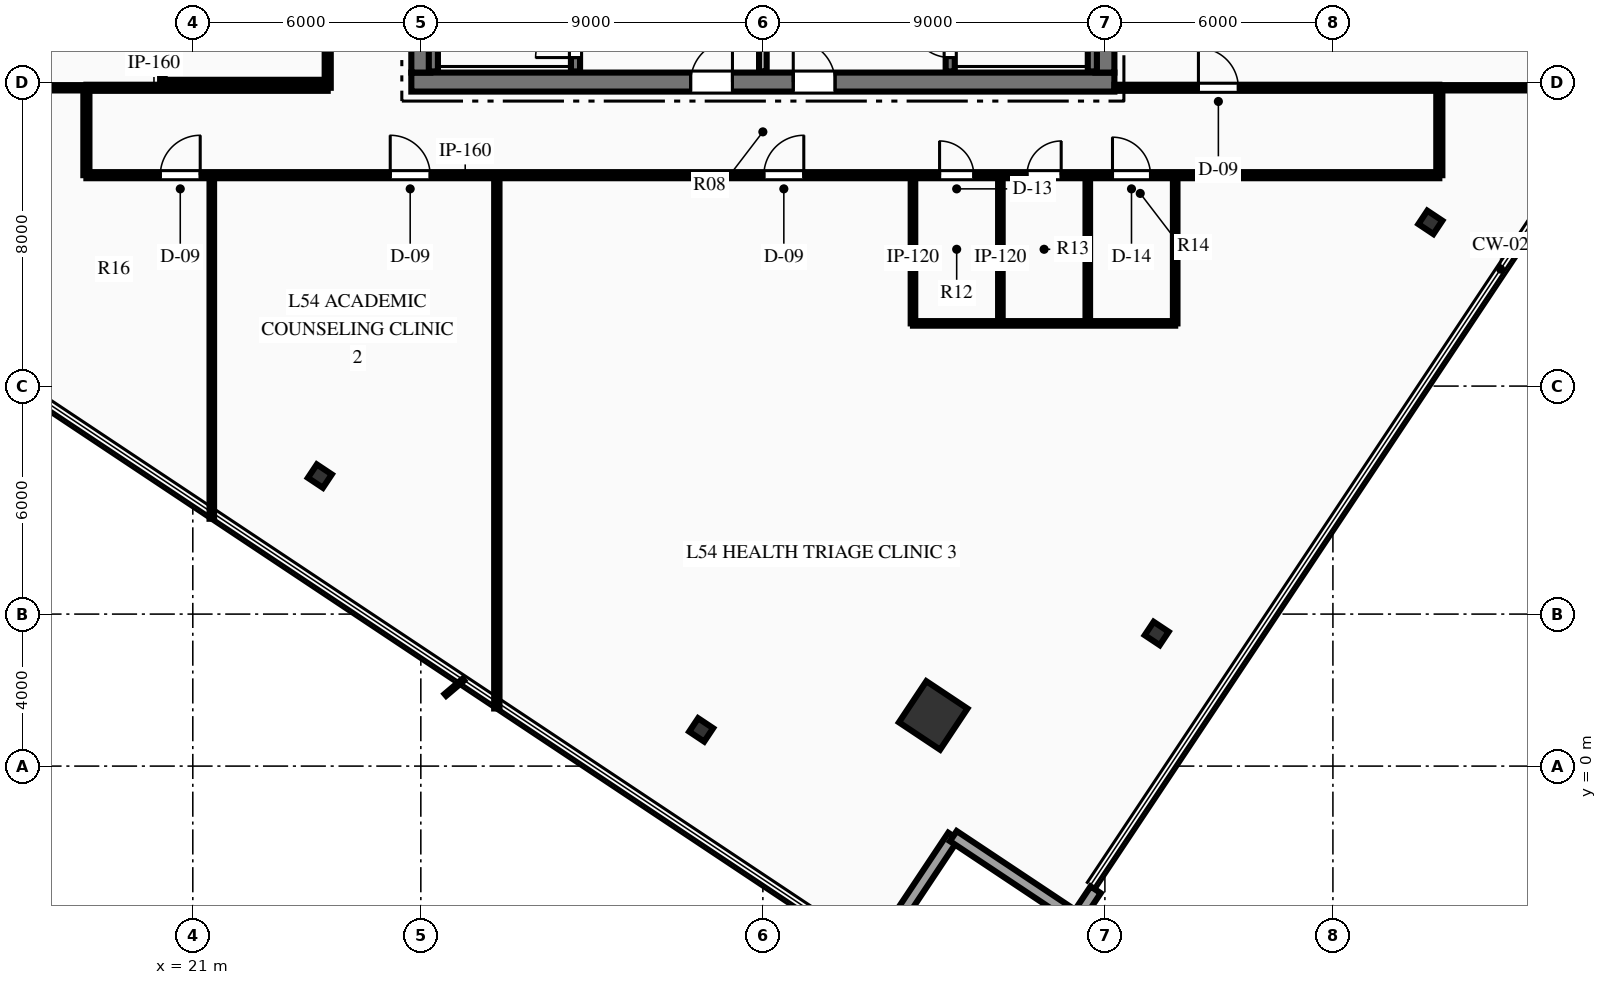
"""IFC4 building model, lengths in metres.
Left out: names, types, materials, properties, quantities, classifications, styles, units other than length and angle.
Written with IfcOpenShell. Run it as: python <this file> out.ifc"""

import sys

from ifc_helpers import new_model, si_unit, direction, frame, frame_2d, origin, origin_2d, place, context, subcontext, project, spatial, rectangle, hollow_rectangle, i_section, extrude, element, fill, save


model = new_model("IFC4")
c1 = context("Model", 3, precision=1e-05, world=origin(), true_north=direction((0.0, 1.0)))
c2 = subcontext(c1, "Body", "Model", "MODEL_VIEW")
j1 = project(units=[si_unit("LENGTHUNIT", "METRE"), si_unit("PLANEANGLEUNIT", "RADIAN")], contexts=[c1])
p1 = place(None, origin())
s1 = spatial("IfcSite", under=j1, at=p1, CompositionType="ELEMENT")
p2 = place(p1, origin())
s2 = spatial("IfcBuilding", under=s1, at=p2, CompositionType="ELEMENT")
p3 = place(p2, frame((0.0, 0.0, 217.2)))
s3 = spatial("IfcBuildingStorey", under=s2, at=p3, CompositionType="ELEMENT", Elevation=217.2)
p4 = place(p3, frame((26.75, 18.0, 0.0), z_axis=(0.0, 0.0, 1.0), x_axis=(1.0, 0.0, 0.0)))
e1 = element("IfcWall", 1, at=p4, inside=s3, PredefinedType="SHEAR", context=c2, shape_type="SweptSolid", body=[
    extrude(rectangle(XDim=18.5, YDim=0.5, at=frame_2d((9.25, 0.0))), origin(), (0.0, 0.0, 1.0), 3.75),
])
p5 = place(p4, frame((7.35, 0.0, 0.0)))
e2 = element("IfcOpeningElement", 2, at=p5, cuts=e1, PredefinedType="OPENING", context=c2, shape_type="SweptSolid", body=[
    extrude(rectangle(XDim=1.1, YDim=2.15, at=frame_2d((0.55, 1.075))), frame((0.0, 0.26, 0.0), z_axis=(0.0, -1.0, 0.0), x_axis=(1.0, 0.0, 0.0)), (0.0, 0.0, 1.0), 0.52),
])
p6 = place(p4, frame((10.05, 0.0, 0.0)))
e3 = element("IfcOpeningElement", 3, at=p6, cuts=e1, PredefinedType="OPENING", context=c2, shape_type="SweptSolid", body=[
    extrude(rectangle(XDim=1.1, YDim=2.15, at=frame_2d((0.55, 1.075))), frame((0.0, 0.26, 0.0), z_axis=(0.0, -1.0, 0.0), x_axis=(1.0, 0.0, 0.0)), (0.0, 0.0, 1.0), 0.52),
])
p7 = place(p3, frame((27.0, 18.25, 0.0), z_axis=(0.0, 0.0, 1.0), x_axis=(0.0, 1.0, 0.0)))
e4 = element("IfcWall", 4, at=p7, inside=s3, PredefinedType="SHEAR", context=c2, shape_type="SweptSolid", body=[
    extrude(rectangle(XDim=15.5, YDim=0.5, at=frame_2d((7.75, 0.0))), origin(), (0.0, 0.0, 1.0), 3.75),
])
p8 = place(p7, frame((9.99, 0.0, 0.0)))
e5 = element("IfcOpeningElement", 5, at=p8, cuts=e4, PredefinedType="OPENING", context=c2, shape_type="SweptSolid", body=[
    extrude(rectangle(XDim=1.4, YDim=2.2, at=frame_2d((0.7, 1.1))), frame((0.0, 0.26, 0.0), z_axis=(0.0, -1.0, 0.0), x_axis=(1.0, 0.0, 0.0)), (0.0, 0.0, 1.0), 0.52),
])
p9 = place(p3, frame((45.0, 18.25, 0.0), z_axis=(0.0, 0.0, 1.0), x_axis=(0.0, 1.0, 0.0)))
e6 = element("IfcWall", 6, at=p9, inside=s3, PredefinedType="SHEAR", context=c2, shape_type="SweptSolid", body=[
    extrude(rectangle(XDim=15.5, YDim=0.5, at=frame_2d((7.75, 0.0))), origin(), (0.0, 0.0, 1.0), 3.75),
])
p10 = place(p9, frame((9.99, 0.0, 0.0)))
e7 = element("IfcOpeningElement", 7, at=p10, cuts=e6, PredefinedType="OPENING", context=c2, shape_type="SweptSolid", body=[
    extrude(rectangle(XDim=1.4, YDim=2.2, at=frame_2d((0.7, 1.1))), frame((0.0, 0.26, 0.0), z_axis=(0.0, -1.0, 0.0), x_axis=(1.0, 0.0, 0.0)), (0.0, 0.0, 1.0), 0.52),
])
p11 = place(p3, frame((31.07, 18.28, 0.0), z_axis=(0.0, 0.0, 1.0), x_axis=(0.0, 1.0, 0.0)))
e8 = element("IfcWall", 8, at=p11, inside=s3, PredefinedType="SHEAR", context=c2, shape_type="SweptSolid", body=[
    extrude(rectangle(XDim=8.26, YDim=0.24, at=frame_2d((4.13, 0.0))), origin(), (0.0, 0.0, 1.0), 3.75),
])
p12 = place(p11, frame((0.365, 0.0, 0.0)))
e9 = element("IfcOpeningElement", 9, at=p12, cuts=e8, PredefinedType="OPENING", context=c2, shape_type="SweptSolid", body=[
    extrude(rectangle(XDim=1.05, YDim=2.15, at=frame_2d((0.525, 1.075))), frame((0.0, 0.13, 0.0), z_axis=(0.0, -1.0, 0.0), x_axis=(1.0, 0.0, 0.0)), (0.0, 0.0, 1.0), 0.26),
])
p13 = place(p3, frame((27.33, 18.28, 0.0), z_axis=(0.0, 0.0, 1.0), x_axis=(0.0, 1.0, 0.0)))
e10 = element("IfcWall", 10, at=p13, inside=s3, PredefinedType="SHEAR", context=c2, shape_type="SweptSolid", body=[
    extrude(rectangle(XDim=8.26, YDim=0.24, at=frame_2d((4.13, 0.0))), origin(), (0.0, 0.0, 1.0), 3.75),
])
p14 = place(p3, frame((40.93, 18.28, 0.0), z_axis=(0.0, 0.0, 1.0), x_axis=(0.0, 1.0, 0.0)))
e11 = element("IfcWall", 11, at=p14, inside=s3, PredefinedType="SHEAR", context=c2, shape_type="SweptSolid", body=[
    extrude(rectangle(XDim=8.26, YDim=0.24, at=frame_2d((4.13, 0.0))), origin(), (0.0, 0.0, 1.0), 3.75),
])
p15 = place(p14, frame((0.365, 0.0, 0.0)))
e12 = element("IfcOpeningElement", 12, at=p15, cuts=e11, PredefinedType="OPENING", context=c2, shape_type="SweptSolid", body=[
    extrude(rectangle(XDim=1.05, YDim=2.15, at=frame_2d((0.525, 1.075))), frame((0.0, 0.13, 0.0), z_axis=(0.0, -1.0, 0.0), x_axis=(1.0, 0.0, 0.0)), (0.0, 0.0, 1.0), 0.26),
])
p16 = place(p3, frame((44.67, 18.28, 0.0), z_axis=(0.0, 0.0, 1.0), x_axis=(0.0, 1.0, 0.0)))
e13 = element("IfcWall", 13, at=p16, inside=s3, PredefinedType="SHEAR", context=c2, shape_type="SweptSolid", body=[
    extrude(rectangle(XDim=8.26, YDim=0.24, at=frame_2d((4.13, 0.0))), origin(), (0.0, 0.0, 1.0), 3.75),
])
p17 = place(p3, frame((40.483, 1.333, 0.0), z_axis=(0.0, 0.0, 1.0), x_axis=(0.554118199338, 0.832437998389, 0.0)))
e14 = element("IfcColumn", 14, at=p17, inside=s3, PredefinedType="COLUMN", context=c2, shape_type="SweptSolid", body=[
    extrude(hollow_rectangle(XDim=1.3, YDim=1.3, WallThickness=0.06, at=origin_2d()), origin(), (0.0, 0.0, 1.0), 3.75),
])
for number, where, z_axis, x_axis in (
    (15, (46.363, 3.49, 0.0), (0.0, 0.0, 1.0), (0.554, 0.832, 0.0)),
    (16, (53.564, 14.308, 0.0), (0.0, 0.0, 1.0), (0.554, 0.832, 0.0)),
    (17, (24.343, 7.631, 0.0), (0.0, 0.0, 1.0), (0.554, 0.832, 0.0)),
    (18, (34.377, 0.952, 0.0), (0.0, 0.0, 1.0), (0.554, 0.832, 0.0)),
):
    element("IfcColumn", number, at=place(p3, frame(where, z_axis=z_axis, x_axis=x_axis)), inside=s3, PredefinedType="COLUMN", context=c2, shape_type="SweptSolid", body=[
        extrude(i_section(OverallWidth=0.424, OverallDepth=0.474, WebThickness=0.048, FlangeThickness=0.077, at=origin_2d()), origin(), (0.0, 0.0, 1.0), 3.75),
    ])
p18 = place(p3, frame((44.757, -3.254, 0.0), z_axis=(0.0, 0.0, 1.0), x_axis=(-0.554261868623, -0.832342346028, 0.0)))
e19 = element("IfcWall", 19, at=p18, inside=s3, PredefinedType="STANDARD", context=c2, shape_type="SweptSolid", body=[
    extrude(rectangle(XDim=0.9, YDim=0.32, at=frame_2d((0.45, 0.0))), origin(), (0.0, 0.0, 1.0), 3.47),
])
p19 = place(p3, frame((41.012, -1.843, 0.0), z_axis=(0.0, 0.0, 1.0), x_axis=(-0.554122229834, -0.832435315447, 0.0)))
e20 = element("IfcWall", 20, at=p19, inside=s3, PredefinedType="STANDARD", context=c2, shape_type="SweptSolid", body=[
    extrude(rectangle(XDim=3.9, YDim=0.32, at=frame_2d((1.95, 0.0))), origin(), (0.0, 0.0, 1.0), 3.47),
])
p20 = place(p3, frame((44.258, -4.003, 0.0), z_axis=(0.0, 0.0, 1.0), x_axis=(-0.832464190202, 0.554078850013, 0.0)))
e21 = element("IfcWall", 21, at=p20, inside=s3, PredefinedType="STANDARD", context=c2, shape_type="SweptSolid", body=[
    extrude(rectangle(XDim=3.9, YDim=0.32, at=frame_2d((1.95, 0.0))), origin(), (0.0, 0.0, 1.0), 3.47),
])
p21 = place(p3, frame((36.0, 18.28, 0.0), z_axis=(0.0, 0.0, 1.0), x_axis=(0.0, 1.0, 0.0)))
e22 = element("IfcWall", 22, at=p21, inside=s3, PredefinedType="PARTITIONING", context=c2, shape_type="SweptSolid", body=[
    extrude(rectangle(XDim=3.77, YDim=0.2, at=frame_2d((1.885, 0.0))), origin(), (0.0, 0.0, 1.0), 3.47),
])
p22 = place(p3, frame((18.2, 15.55, 0.0), z_axis=(0.0, 0.0, 1.0), x_axis=(1.0, 0.0, 0.0)))
e23 = element("IfcWall", 23, at=p22, inside=s3, PredefinedType="PARTITIONING", context=c2, shape_type="SweptSolid", body=[
    extrude(rectangle(XDim=35.6, YDim=0.16, at=frame_2d((17.8, 0.0))), origin(), (0.0, 0.0, 1.0), 2.849),
])
p23 = place(p22, frame((22.45, 0.0, 0.0)))
e24 = element("IfcOpeningElement", 24, at=p23, cuts=e23, PredefinedType="OPENING", context=c2, shape_type="SweptSolid", body=[
    extrude(rectangle(XDim=0.9, YDim=2.15, at=frame_2d((0.45, 1.075))), frame((0.0, 0.09, 0.0), z_axis=(0.0, -1.0, 0.0), x_axis=(1.0, 0.0, 0.0)), (0.0, 0.0, 1.0), 0.18),
])
p24 = place(p22, frame((24.75, 0.0, 0.0)))
e25 = element("IfcOpeningElement", 25, at=p24, cuts=e23, PredefinedType="OPENING", context=c2, shape_type="SweptSolid", body=[
    extrude(rectangle(XDim=0.9, YDim=2.15, at=frame_2d((0.45, 1.075))), frame((0.0, 0.09, 0.0), z_axis=(0.0, -1.0, 0.0), x_axis=(1.0, 0.0, 0.0)), (0.0, 0.0, 1.0), 0.18),
])
p25 = place(p22, frame((27.0, 0.0, 0.0)))
e26 = element("IfcOpeningElement", 26, at=p25, cuts=e23, PredefinedType="OPENING", context=c2, shape_type="SweptSolid", body=[
    extrude(rectangle(XDim=1.0, YDim=2.15, at=frame_2d((0.5, 1.075))), frame((0.0, 0.09, 0.0), z_axis=(0.0, -1.0, 0.0), x_axis=(1.0, 0.0, 0.0)), (0.0, 0.0, 1.0), 0.18),
])
p26 = place(p22, frame((1.945, 0.0, 0.0)))
e27 = element("IfcOpeningElement", 27, at=p26, cuts=e23, PredefinedType="OPENING", context=c2, shape_type="SweptSolid", body=[
    extrude(rectangle(XDim=1.05, YDim=2.15, at=frame_2d((0.525, 1.075))), frame((0.0, 0.09, 0.0), z_axis=(0.0, -1.0, 0.0), x_axis=(1.0, 0.0, 0.0)), (0.0, 0.0, 1.0), 0.18),
])
p27 = place(p22, frame((7.995, 0.0, 0.0)))
e28 = element("IfcOpeningElement", 28, at=p27, cuts=e23, PredefinedType="OPENING", context=c2, shape_type="SweptSolid", body=[
    extrude(rectangle(XDim=1.05, YDim=2.15, at=frame_2d((0.525, 1.075))), frame((0.0, 0.09, 0.0), z_axis=(0.0, -1.0, 0.0), x_axis=(1.0, 0.0, 0.0)), (0.0, 0.0, 1.0), 0.18),
])
p28 = place(p22, frame((17.827, 0.0, 0.0)))
e29 = element("IfcOpeningElement", 29, at=p28, cuts=e23, PredefinedType="OPENING", context=c2, shape_type="SweptSolid", body=[
    extrude(rectangle(XDim=1.05, YDim=2.15, at=frame_2d((0.525, 1.075))), frame((0.0, 0.09, 0.0), z_axis=(0.0, -1.0, 0.0), x_axis=(1.0, 0.0, 0.0)), (0.0, 0.0, 1.0), 0.18),
])
p29 = place(p3, frame((18.2, 17.85, 0.0), z_axis=(0.0, 0.0, 1.0), x_axis=(1.0, 0.0, 0.0)))
e30 = element("IfcWall", 30, at=p29, inside=s3, PredefinedType="PARTITIONING", context=c2, shape_type="SweptSolid", body=[
    extrude(rectangle(XDim=6.35, YDim=0.16, at=frame_2d((3.175, 0.0))), origin(), (0.0, 0.0, 1.0), 3.47),
])
p30 = place(p3, frame((45.25, 17.85, 0.0), z_axis=(0.0, 0.0, 1.0), x_axis=(1.0, 0.0, 0.0)))
e31 = element("IfcWall", 31, at=p30, inside=s3, PredefinedType="PARTITIONING", context=c2, shape_type="SweptSolid", body=[
    extrude(rectangle(XDim=8.55, YDim=0.16, at=frame_2d((4.275, 0.0))), origin(), (0.0, 0.0, 1.0), 3.47),
])
p31 = place(p30, frame((2.211, 0.0, 0.0)))
e32 = element("IfcOpeningElement", 32, at=p31, cuts=e31, PredefinedType="OPENING", context=c2, shape_type="SweptSolid", body=[
    extrude(rectangle(XDim=1.05, YDim=2.15, at=frame_2d((0.525, 1.075))), frame((0.0, 0.09, 0.0), z_axis=(0.0, -1.0, 0.0), x_axis=(1.0, 0.0, 0.0)), (0.0, 0.0, 1.0), 0.18),
])
p32 = place(p3, frame((24.55, 17.85, 0.0), z_axis=(0.0, 0.0, 1.0), x_axis=(0.0, 1.0, 0.0)))
e33 = element("IfcWall", 33, at=p32, inside=s3, PredefinedType="PARTITIONING", context=c2, shape_type="SweptSolid", body=[
    extrude(rectangle(XDim=16.3, YDim=0.16, at=frame_2d((8.15, 0.0))), origin(), (0.0, 0.0, 1.0), 3.47),
])
p33 = place(p32, frame((2.775, 0.0, 0.0)))
e34 = element("IfcOpeningElement", 34, at=p33, cuts=e33, PredefinedType="OPENING", context=c2, shape_type="SweptSolid", body=[
    extrude(rectangle(XDim=0.95, YDim=2.15, at=frame_2d((0.475, 1.075))), frame((0.0, 0.09, 0.0), z_axis=(0.0, -1.0, 0.0), x_axis=(1.0, 0.0, 0.0)), (0.0, 0.0, 1.0), 0.18),
])
p34 = place(p32, frame((8.729, 0.0, 0.0)))
e35 = element("IfcOpeningElement", 35, at=p34, cuts=e33, PredefinedType="OPENING", context=c2, shape_type="SweptSolid", body=[
    extrude(rectangle(XDim=1.05, YDim=2.15, at=frame_2d((0.525, 1.075))), frame((0.0, 0.09, 0.0), z_axis=(0.0, -1.0, 0.0), x_axis=(1.0, 0.0, 0.0)), (0.0, 0.0, 1.0), 0.18),
])
for number, where, z_axis, x_axis in (
    (36, (18.2, 15.55, 0.0), (0.0, 0.0, 1.0), (0.0, 1.0, 0.0)),
    (37, (53.8, 15.55, 0.0), (0.0, 0.0, 1.0), (0.0, 1.0, 0.0)),
):
    element("IfcWall", number, at=place(p3, frame(where, z_axis=z_axis, x_axis=x_axis)), inside=s3, PredefinedType="PARTITIONING", context=c2, shape_type="SweptSolid", body=[
        extrude(rectangle(XDim=2.3, YDim=0.16, at=frame_2d((1.15, 0.0))), origin(), (0.0, 0.0, 1.0), 3.47),
    ])
for number, where, z_axis, x_axis in (
    (38, (39.95, 11.65, 0.0), (0.0, 0.0, 1.0), (0.0, 1.0, 0.0)),
    (39, (42.25, 11.65, 0.0), (0.0, 0.0, 1.0), (0.0, 1.0, 0.0)),
    (40, (44.55, 11.65, 0.0), (0.0, 0.0, 1.0), (0.0, 1.0, 0.0)),
    (41, (46.85, 11.65, 0.0), (0.0, 0.0, 1.0), (0.0, 1.0, 0.0)),
):
    element("IfcWall", number, at=place(p3, frame(where, z_axis=z_axis, x_axis=x_axis)), inside=s3, PredefinedType="PARTITIONING", context=c2, shape_type="SweptSolid", body=[
        extrude(rectangle(XDim=3.9, YDim=0.12, at=frame_2d((1.95, 0.0))), origin(), (0.0, 0.0, 1.0), 3.47),
    ])
p35 = place(p3, frame((39.95, 11.65, 0.0), z_axis=(0.0, 0.0, 1.0), x_axis=(1.0, 0.0, 0.0)))
e42 = element("IfcWall", 42, at=p35, inside=s3, PredefinedType="PARTITIONING", context=c2, shape_type="SweptSolid", body=[
    extrude(rectangle(XDim=6.9, YDim=0.12, at=frame_2d((3.45, 0.0))), origin(), (0.0, 0.0, 1.0), 3.47),
])
p36 = place(p3, frame((8.039, 17.85, 0.0), z_axis=(0.0, 0.0, 1.0), x_axis=(1.0, 0.0, 0.0)))
e43 = element("IfcWall", 43, at=p36, inside=s3, PredefinedType="PARTITIONING", context=c2, shape_type="SweptSolid", body=[
    extrude(rectangle(XDim=10.161, YDim=0.14, at=frame_2d((5.081, 0.0))), origin(), (0.0, 0.0, 1.0), 3.47),
])
p37 = place(p3, frame((53.8, 17.85, 0.0), z_axis=(0.0, 0.0, 1.0), x_axis=(1.0, 0.0, 0.0)))
e44 = element("IfcWall", 44, at=p37, inside=s3, PredefinedType="PARTITIONING", context=c2, shape_type="SweptSolid", body=[
    extrude(rectangle(XDim=4.957, YDim=0.14, at=frame_2d((2.479, 0.0))), origin(), (0.0, 0.0, 1.0), 3.47),
])
p38 = place(p3, frame((21.5, 6.509, 0.0), z_axis=(0.0, 0.0, 1.0), x_axis=(0.0, 1.0, 0.0)))
e45 = element("IfcWall", 45, at=p38, inside=s3, PredefinedType="PARTITIONING", context=c2, shape_type="SweptSolid", body=[
    extrude(rectangle(XDim=9.041, YDim=0.12, at=frame_2d((4.521, 0.0))), origin(), (0.0, 0.0, 1.0), 3.47),
])
p39 = place(p3, frame((29.0, 1.516, 0.0), z_axis=(0.0, 0.0, 1.0), x_axis=(0.0, 1.0, 0.0)))
e46 = element("IfcWall", 46, at=p39, inside=s3, PredefinedType="PARTITIONING", context=c2, shape_type="SweptSolid", body=[
    extrude(rectangle(XDim=14.034, YDim=0.14, at=frame_2d((7.017, 0.0))), origin(), (0.0, 0.0, 1.0), 3.47),
])
p40 = place(p3, frame((20.2, 18.0, 0.0), z_axis=(0.0, 0.0, 1.0), x_axis=(1.0, 0.0, 0.0)))
e47 = element("IfcWall", 47, at=p40, inside=s3, PredefinedType="PARTITIONING", context=c2, shape_type="SweptSolid", body=[
    extrude(rectangle(XDim=4.35, YDim=0.12, at=frame_2d((2.175, 0.0))), origin(), (0.0, 0.0, 1.0), 3.47),
])
p41 = place(p3, frame((20.2, 18.0, 0.0), z_axis=(0.0, 0.0, 1.0), x_axis=(0.0, 1.0, 0.0)))
e48 = element("IfcWall", 48, at=p41, inside=s3, PredefinedType="PARTITIONING", context=c2, shape_type="SweptSolid", body=[
    extrude(rectangle(XDim=6.2, YDim=0.12, at=frame_2d((3.1, 0.0))), origin(), (0.0, 0.0, 1.0), 3.47),
])
p42 = place(p41, frame((3.825, 0.0, 0.0)))
e49 = element("IfcOpeningElement", 49, at=p42, cuts=e48, PredefinedType="OPENING", context=c2, shape_type="SweptSolid", body=[
    extrude(rectangle(XDim=0.95, YDim=2.15, at=frame_2d((0.475, 1.075))), frame((0.0, 0.07, 0.0), z_axis=(0.0, -1.0, 0.0), x_axis=(1.0, 0.0, 0.0)), (0.0, 0.0, 1.0), 0.14),
])
p43 = place(p12, origin())
e50 = element("IfcDoor", 50, at=p43, inside=s3, OperationType="SINGLE_SWING_LEFT", PredefinedType="DOOR", context=c2, shape_type="SweptSolid", body=[
    extrude(rectangle(XDim=1.05, YDim=2.15, at=frame_2d((0.525, 1.075))), frame((0.0, 0.025, 0.0), z_axis=(0.0, -1.0, 0.0), x_axis=(1.0, 0.0, 0.0)), (0.0, 0.0, 1.0), 0.05),
])
fill(e9, e50)
p44 = place(p15, origin())
e51 = element("IfcDoor", 51, at=p44, inside=s3, OperationType="SINGLE_SWING_RIGHT", PredefinedType="DOOR", context=c2, shape_type="SweptSolid", body=[
    extrude(rectangle(XDim=1.05, YDim=2.15, at=frame_2d((0.525, 1.075))), frame((0.0, 0.025, 0.0), z_axis=(0.0, -1.0, 0.0), x_axis=(1.0, 0.0, 0.0)), (0.0, 0.0, 1.0), 0.05),
])
fill(e12, e51)
p45 = place(p5, origin())
e52 = element("IfcDoor", 52, at=p45, inside=s3, OperationType="SINGLE_SWING_RIGHT", PredefinedType="DOOR", context=c2, shape_type="SweptSolid", body=[
    extrude(rectangle(XDim=1.1, YDim=2.15, at=frame_2d((0.55, 1.075))), frame((0.0, 0.025, 0.0), z_axis=(0.0, -1.0, 0.0), x_axis=(1.0, 0.0, 0.0)), (0.0, 0.0, 1.0), 0.05),
])
fill(e2, e52)
p46 = place(p6, origin())
e53 = element("IfcDoor", 53, at=p46, inside=s3, OperationType="SINGLE_SWING_LEFT", PredefinedType="DOOR", context=c2, shape_type="SweptSolid", body=[
    extrude(rectangle(XDim=1.1, YDim=2.15, at=frame_2d((0.55, 1.075))), frame((0.0, 0.025, 0.0), z_axis=(0.0, -1.0, 0.0), x_axis=(1.0, 0.0, 0.0)), (0.0, 0.0, 1.0), 0.05),
])
fill(e3, e53)
p47 = place(p23, origin())
e54 = element("IfcDoor", 54, at=p47, inside=s3, OperationType="SINGLE_SWING_LEFT", PredefinedType="DOOR", context=c2, shape_type="SweptSolid", body=[
    extrude(rectangle(XDim=0.9, YDim=2.15, at=frame_2d((0.45, 1.075))), frame((0.0, 0.025, 0.0), z_axis=(0.0, -1.0, 0.0), x_axis=(1.0, 0.0, 0.0)), (0.0, 0.0, 1.0), 0.05),
])
fill(e24, e54)
p48 = place(p24, origin())
e55 = element("IfcDoor", 55, at=p48, inside=s3, OperationType="SINGLE_SWING_RIGHT", PredefinedType="DOOR", context=c2, shape_type="SweptSolid", body=[
    extrude(rectangle(XDim=0.9, YDim=2.15, at=frame_2d((0.45, 1.075))), frame((0.0, 0.025, 0.0), z_axis=(0.0, -1.0, 0.0), x_axis=(1.0, 0.0, 0.0)), (0.0, 0.0, 1.0), 0.05),
])
fill(e25, e55)
p49 = place(p25, origin())
e56 = element("IfcDoor", 56, at=p49, inside=s3, OperationType="SINGLE_SWING_LEFT", PredefinedType="DOOR", context=c2, shape_type="SweptSolid", body=[
    extrude(rectangle(XDim=1.0, YDim=2.15, at=frame_2d((0.5, 1.075))), frame((0.0, 0.025, 0.0), z_axis=(0.0, -1.0, 0.0), x_axis=(1.0, 0.0, 0.0)), (0.0, 0.0, 1.0), 0.05),
])
fill(e26, e56)
p50 = place(p26, origin())
e57 = element("IfcDoor", 57, at=p50, inside=s3, OperationType="SINGLE_SWING_RIGHT", PredefinedType="DOOR", context=c2, shape_type="SweptSolid", body=[
    extrude(rectangle(XDim=1.05, YDim=2.15, at=frame_2d((0.525, 1.075))), frame((0.0, 0.025, 0.0), z_axis=(0.0, -1.0, 0.0), x_axis=(1.0, 0.0, 0.0)), (0.0, 0.0, 1.0), 0.05),
])
fill(e27, e57)
p51 = place(p27, origin())
e58 = element("IfcDoor", 58, at=p51, inside=s3, OperationType="SINGLE_SWING_LEFT", PredefinedType="DOOR", context=c2, shape_type="SweptSolid", body=[
    extrude(rectangle(XDim=1.05, YDim=2.15, at=frame_2d((0.525, 1.075))), frame((0.0, 0.025, 0.0), z_axis=(0.0, -1.0, 0.0), x_axis=(1.0, 0.0, 0.0)), (0.0, 0.0, 1.0), 0.05),
])
fill(e28, e58)
p52 = place(p28, origin())
e59 = element("IfcDoor", 59, at=p52, inside=s3, OperationType="SINGLE_SWING_RIGHT", PredefinedType="DOOR", context=c2, shape_type="SweptSolid", body=[
    extrude(rectangle(XDim=1.05, YDim=2.15, at=frame_2d((0.525, 1.075))), frame((0.0, 0.025, 0.0), z_axis=(0.0, -1.0, 0.0), x_axis=(1.0, 0.0, 0.0)), (0.0, 0.0, 1.0), 0.05),
])
fill(e29, e59)
p53 = place(p31, origin())
e60 = element("IfcDoor", 60, at=p53, inside=s3, OperationType="SINGLE_SWING_LEFT", PredefinedType="DOOR", context=c2, shape_type="SweptSolid", body=[
    extrude(rectangle(XDim=1.05, YDim=2.15, at=frame_2d((0.525, 1.075))), frame((0.0, 0.025, 0.0), z_axis=(0.0, -1.0, 0.0), x_axis=(1.0, 0.0, 0.0)), (0.0, 0.0, 1.0), 0.05),
])
fill(e32, e60)
save(model, sys.argv[1])
